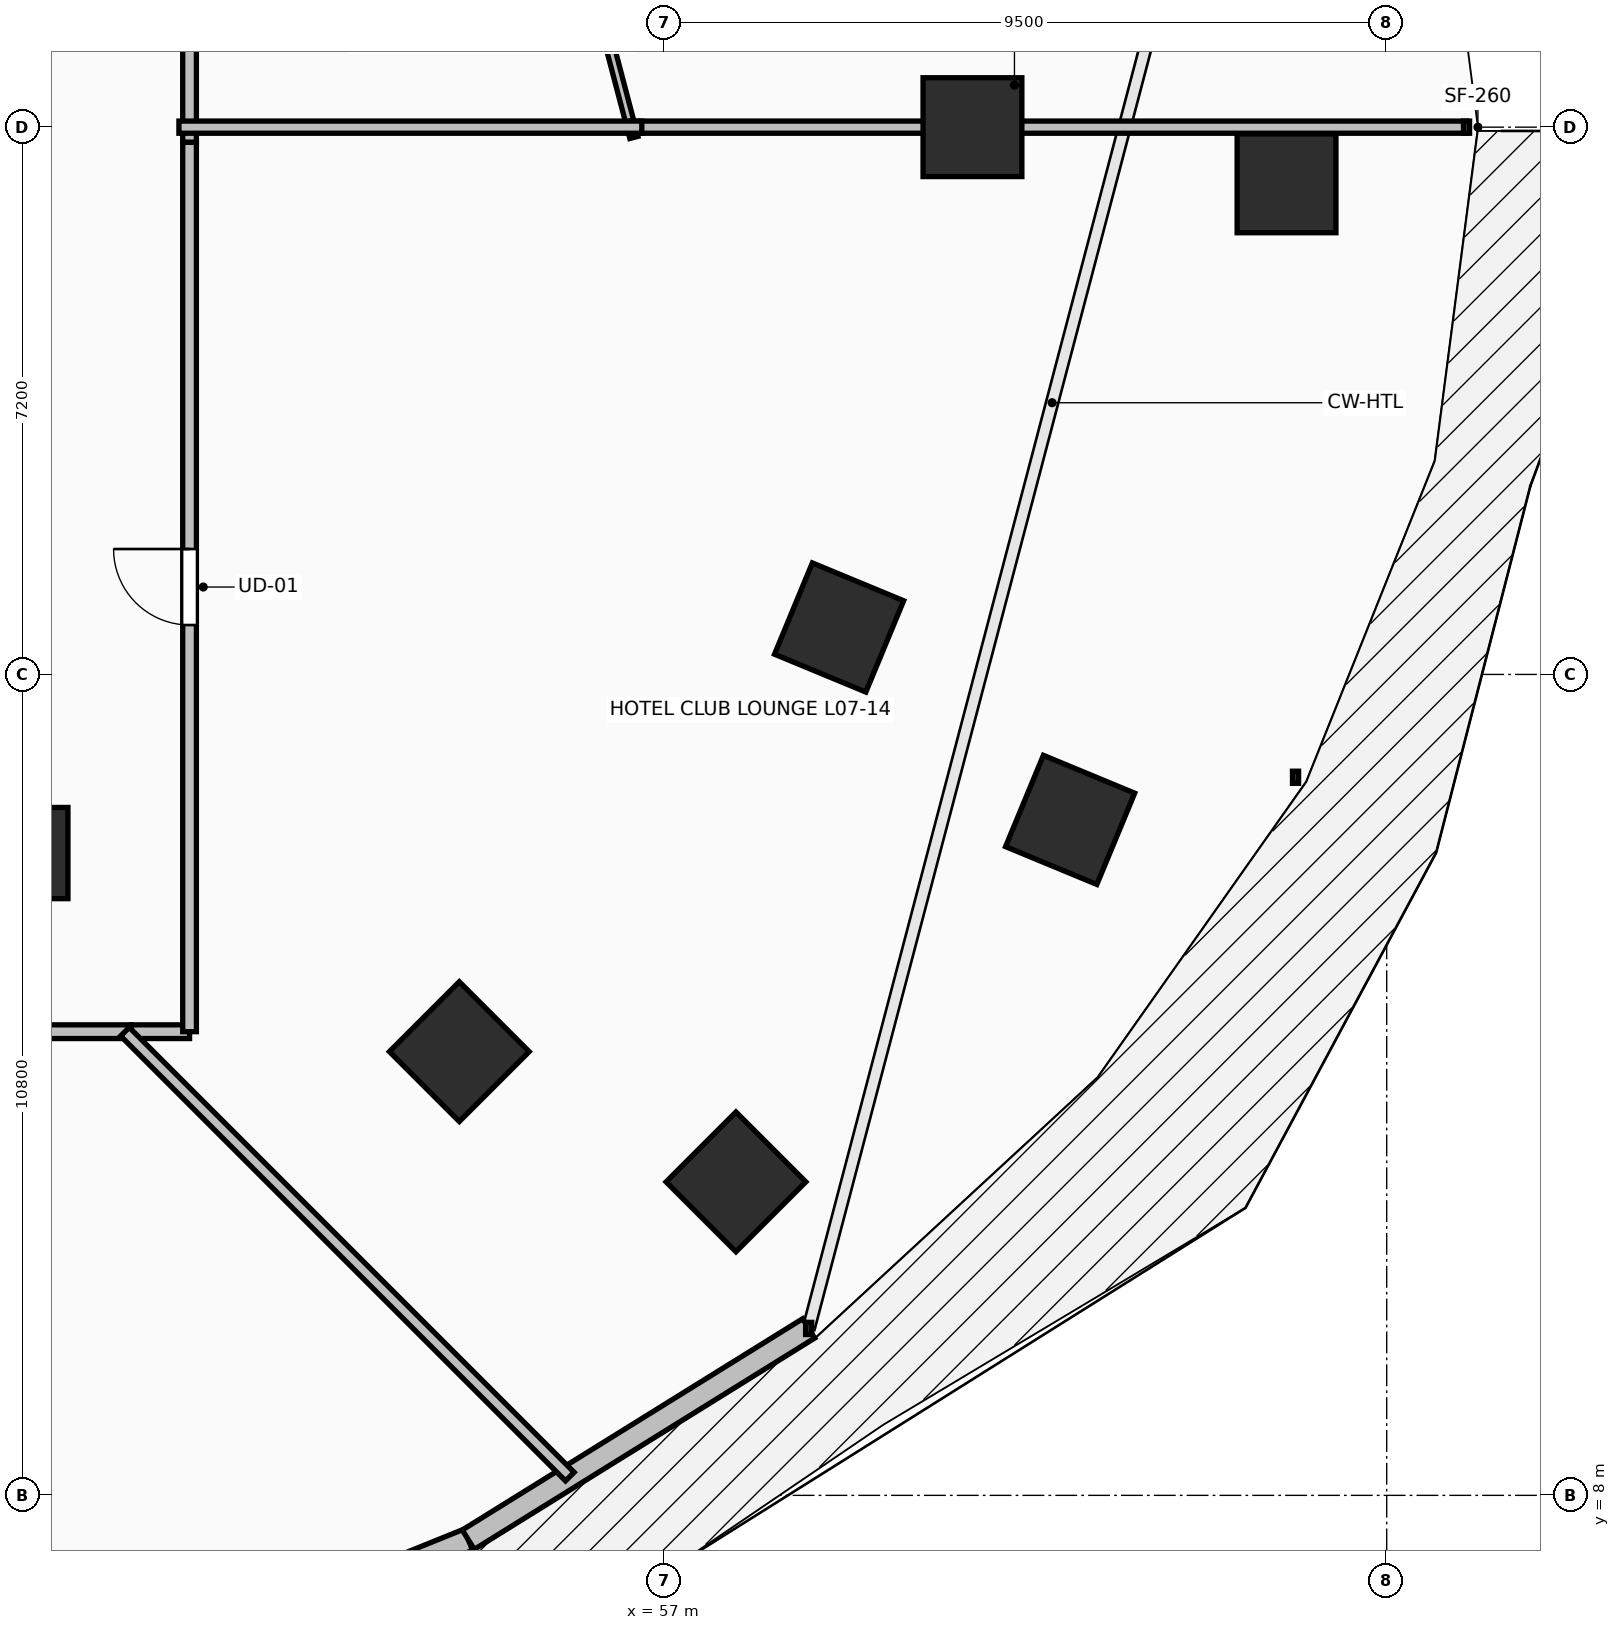
"""IFC4 building model, lengths in metres.
Left out: names, types, materials, properties, quantities, classifications, styles, units other than length and angle.
Written with IfcOpenShell. Run it as: python <this file> out.ifc"""

import sys

from ifc_helpers import new_model, si_unit, direction, frame, frame_2d, origin, origin_2d, place, context, subcontext, project, spatial, rectangle, extrude, element, fill, save


model = new_model("IFC4")
c1 = context("Model", 3, precision=1e-05, world=origin(), true_north=direction((0.0, 1.0)))
c2 = subcontext(c1, "Body", "Model", "MODEL_VIEW")
j1 = project(units=[si_unit("LENGTHUNIT", "METRE"), si_unit("PLANEANGLEUNIT", "RADIAN")], contexts=[c1])
p1 = place(None, origin())
s1 = spatial("IfcSite", under=j1, at=p1, CompositionType="ELEMENT")
p2 = place(p1, origin())
s2 = spatial("IfcBuilding", under=s1, at=p2, CompositionType="ELEMENT")
p3 = place(p2, frame((0.0, 0.0, 31.0)))
s3 = spatial("IfcBuildingStorey", under=s2, at=p3, CompositionType="ELEMENT", Elevation=31.0)
for number, where, z_axis, x_axis in (
    (1, (61.05, 26.0, 0.0), (0.0, 0.0, 1.0), (1.0, 0.0, 0.0)),
    (2, (54.299, 13.838, 0.0), (0.0, 0.0, 1.0), (0.707, -0.707, 0.0)),
    (3, (59.295, 19.418, 0.0), (0.0, 0.0, 1.0), (0.924, -0.383, 0.0)),
    (4, (65.182, 25.261, 0.0), (0.0, 0.0, 1.0), (1.0, 0.0, 0.0)),
    (5, (57.939, 12.124, 0.0), (0.0, 0.0, 1.0), (0.707, -0.707, 0.0)),
    (6, (62.335, 16.886, 0.0), (0.0, 0.0, 1.0), (0.924, -0.383, 0.0)),
):
    element("IfcColumn", number, at=place(p3, frame(where, z_axis=z_axis, x_axis=x_axis)), inside=s3, PredefinedType="COLUMN", context=c2, shape_type="SweptSolid", body=[
        extrude(rectangle(XDim=1.3, YDim=1.3, at=origin_2d()), origin(), (0.0, 0.0, 1.0), 3.5),
    ])
p4 = place(p3, frame((48.75, 16.45, 0.0), z_axis=(0.0, 0.0, 1.0), x_axis=(1.0, 0.0, 0.0)))
e7 = element("IfcColumn", 7, at=p4, inside=s3, PredefinedType="PILASTER", context=c2, shape_type="SweptSolid", body=[
    extrude(rectangle(XDim=0.8, YDim=1.2, at=origin_2d()), origin(), (0.0, 0.0, 1.0), 3.5),
])
p5 = place(p3, frame((49.308, 5.351, 0.0), z_axis=(0.0, 0.0, 1.0), x_axis=(0.927095325176, 0.374825636845, 0.0)))
e8 = element("IfcWall", 8, at=p5, inside=s3, PredefinedType="STANDARD", context=c2, shape_type="SweptSolid", body=[
    extrude(rectangle(XDim=5.51, YDim=0.3, at=frame_2d((2.755, 0.0))), origin(), (0.0, 0.0, 1.0), 3.24),
])
p6 = place(p5, frame((1.955, 0.0, 0.0)))
e9 = element("IfcOpeningElement", 9, at=p6, cuts=e8, PredefinedType="OPENING", context=c2, shape_type="SweptSolid", body=[
    extrude(rectangle(XDim=1.6, YDim=2.3, at=frame_2d((0.8, 1.15))), frame((0.0, 0.165, 0.0), z_axis=(0.0, -1.0, 0.0), x_axis=(1.0, 0.0, 0.0)), (0.0, 0.0, 1.0), 0.33),
])
p7 = place(p3, frame((54.417, 7.417, 0.0), z_axis=(0.0, 0.0, 1.0), x_axis=(0.849633724826, 0.527373239404, 0.0)))
e10 = element("IfcWall", 10, at=p7, inside=s3, PredefinedType="STANDARD", context=c2, shape_type="SweptSolid", body=[
    extrude(rectangle(XDim=5.271, YDim=0.3, at=frame_2d((2.635, 0.0))), origin(), (0.0, 0.0, 1.0), 3.24),
])
p8 = place(p3, frame((50.75, 25.8, 0.0), z_axis=(0.0, 0.0, 1.0), x_axis=(0.0, 1.0, 0.0)))
e11 = element("IfcWall", 11, at=p8, inside=s3, PredefinedType="PARTITIONING", context=c2, shape_type="SweptSolid", body=[
    extrude(rectangle(XDim=2.505, YDim=0.18, at=frame_2d((1.252, 0.0))), origin(), (0.0, 0.0, 1.0), 2.432),
])
p9 = place(p3, frame((42.34, 14.1, 0.0), z_axis=(0.0, 0.0, 1.0), x_axis=(1.0, 0.0, 0.0)))
e12 = element("IfcWall", 12, at=p9, inside=s3, PredefinedType="PARTITIONING", context=c2, shape_type="SweptSolid", body=[
    extrude(rectangle(XDim=7.645, YDim=0.18, at=frame_2d((3.823, 0.0))), origin(), (0.0, 0.0, 1.0), 2.432),
])
p10 = place(p9, frame((3.298, 0.0, 0.0)))
e13 = element("IfcOpeningElement", 13, at=p10, cuts=e12, PredefinedType="OPENING", context=c2, shape_type="SweptSolid", body=[
    extrude(rectangle(XDim=1.05, YDim=2.2, at=frame_2d((0.525, 1.1))), frame((0.0, 0.105, 0.0), z_axis=(0.0, -1.0, 0.0), x_axis=(1.0, 0.0, 0.0)), (0.0, 0.0, 1.0), 0.21),
])
p11 = place(p3, frame((49.985, 14.1, 0.0), z_axis=(0.0, 0.0, 1.0), x_axis=(1.0, 0.0, 0.0)))
e14 = element("IfcWall", 14, at=p11, inside=s3, PredefinedType="PARTITIONING", context=c2, shape_type="SweptSolid", body=[
    extrude(rectangle(XDim=0.765, YDim=0.18, at=frame_2d((0.382, 0.0))), origin(), (0.0, 0.0, 1.0), 3.24),
])
p12 = place(p3, frame((50.75, 14.1, 0.0), z_axis=(0.0, 0.0, 1.0), x_axis=(0.0, 1.0, 0.0)))
e15 = element("IfcWall", 15, at=p12, inside=s3, PredefinedType="PARTITIONING", context=c2, shape_type="SweptSolid", body=[
    extrude(rectangle(XDim=11.7, YDim=0.18, at=frame_2d((5.85, 0.0))), origin(), (0.0, 0.0, 1.0), 2.432),
])
p13 = place(p12, frame((5.35, 0.0, 0.0)))
e16 = element("IfcOpeningElement", 16, at=p13, cuts=e15, PredefinedType="OPENING", context=c2, shape_type="SweptSolid", body=[
    extrude(rectangle(XDim=1.0, YDim=2.15, at=frame_2d((0.5, 1.075))), frame((0.0, 0.105, 0.0), z_axis=(0.0, -1.0, 0.0), x_axis=(1.0, 0.0, 0.0)), (0.0, 0.0, 1.0), 0.21),
])
p14 = place(p3, frame((55.709, 29.232, 0.0), z_axis=(0.0, 0.0, 1.0), x_axis=(0.254476045764, -0.967079077497, 0.0)))
e17 = element("IfcWall", 17, at=p14, inside=s3, PredefinedType="PARTITIONING", context=c2, shape_type="SweptSolid", body=[
    extrude(rectangle(XDim=3.483, YDim=0.11, at=frame_2d((1.741, 0.0))), origin(), (0.0, 0.0, 1.0), 2.432),
])
p15 = place(p3, frame((56.56, 26.0, 0.0), z_axis=(0.0, 0.0, 1.0), x_axis=(1.0, 0.0, 0.0)))
e18 = element("IfcWall", 18, at=p15, inside=s3, PredefinedType="PARTITIONING", context=c2, shape_type="SweptSolid", body=[
    extrude(rectangle(XDim=10.989, YDim=0.16, at=frame_2d((5.495, 0.0))), origin(), (0.0, 0.0, 1.0), 2.432),
])
p16 = place(p3, frame((50.61, 26.0, 0.0), z_axis=(0.0, 0.0, 1.0), x_axis=(1.0, 0.0, 0.0)))
e19 = element("IfcWall", 19, at=p16, inside=s3, PredefinedType="PARTITIONING", context=c2, shape_type="SweptSolid", body=[
    extrude(rectangle(XDim=6.09, YDim=0.16, at=frame_2d((3.045, 0.0))), origin(), (0.0, 0.0, 1.0), 2.432),
])
p17 = place(p3, frame((55.753, 8.247, 0.0), z_axis=(0.0, 0.0, 1.0), x_axis=(-0.707106781187, 0.707106781187, 0.0)))
e20 = element("IfcWall", 20, at=p17, inside=s3, PredefinedType="PARTITIONING", context=c2, shape_type="SweptSolid", body=[
    extrude(rectangle(XDim=8.277, YDim=0.16, at=frame_2d((4.139, 0.0))), origin(), (0.0, 0.0, 1.0), 2.624),
])
p18 = place(p13, origin())
e21 = element("IfcDoor", 21, at=p18, inside=s3, OperationType="SINGLE_SWING_RIGHT", PredefinedType="DOOR", context=c2, shape_type="SweptSolid", body=[
    extrude(rectangle(XDim=1.0, YDim=2.15, at=frame_2d((0.5, 1.075))), frame((0.0, 0.025, 0.0), z_axis=(0.0, -1.0, 0.0), x_axis=(1.0, 0.0, 0.0)), (0.0, 0.0, 1.0), 0.05),
])
fill(e16, e21)
save(model, sys.argv[1])
